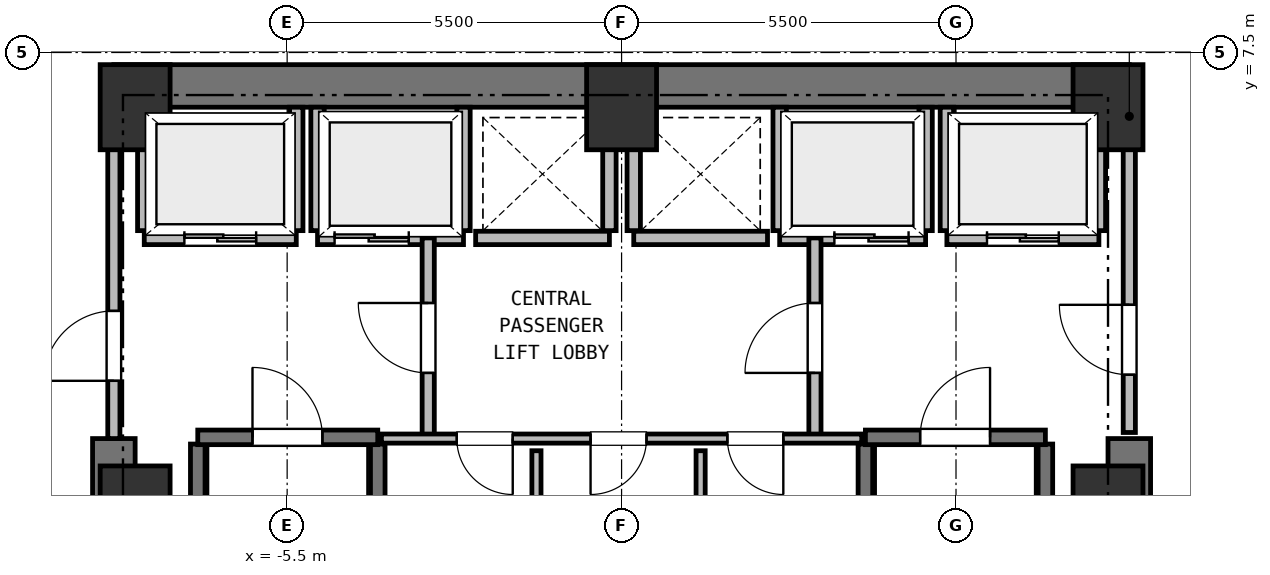
"""IFC4 building model, lengths in metres.
Left out: names, types, materials, properties, quantities, classifications, styles, units other than length and angle.
Written with IfcOpenShell. Run it as: python <this file> out.ifc"""

import sys

from ifc_helpers import new_model, si_unit, direction, frame, frame_2d, origin, origin_2d, place, context, subcontext, project, spatial, rectangle, extrude, element, fill, save


model = new_model("IFC4")
c1 = context("Model", 3, precision=1e-05, world=origin(), true_north=direction((0.0, 1.0)))
c2 = subcontext(c1, "Body", "Model", "MODEL_VIEW")
j1 = project(units=[si_unit("LENGTHUNIT", "METRE"), si_unit("PLANEANGLEUNIT", "RADIAN")], contexts=[c1])
p1 = place(None, origin())
s1 = spatial("IfcSite", under=j1, at=p1, CompositionType="ELEMENT")
p2 = place(p1, origin())
s2 = spatial("IfcBuilding", under=s1, at=p2, CompositionType="ELEMENT")
p3 = place(p2, frame((0.0, 0.0, 16.0)))
s3 = spatial("IfcBuildingStorey", under=s2, at=p3, CompositionType="ELEMENT", Elevation=16.0)
for number, where, z_axis, x_axis in (
    (1, (8.0, 0.0, 0.0), (0.0, 0.0, 1.0), (1.0, 0.0, 0.0)),
    (2, (8.0, 6.6, 0.0), (0.0, 0.0, 1.0), (1.0, 0.0, 0.0)),
    (3, (0.0, 6.6, 0.0), (0.0, 0.0, 1.0), (1.0, 0.0, 0.0)),
    (4, (-8.0, 6.6, 0.0), (0.0, 0.0, 1.0), (1.0, 0.0, 0.0)),
    (5, (-8.0, 0.0, 0.0), (0.0, 0.0, 1.0), (1.0, 0.0, 0.0)),
):
    element("IfcColumn", number, at=place(p3, frame(where, z_axis=z_axis, x_axis=x_axis)), inside=s3, PredefinedType="COLUMN", context=c2, shape_type="SweptSolid", body=[
        extrude(rectangle(XDim=1.15, YDim=1.4, at=origin_2d()), origin(), (0.0, 0.0, 1.0), 5.5),
    ])
p4 = place(p3, frame((-8.35, 6.95, 0.0), z_axis=(0.0, 0.0, 1.0), x_axis=(1.0, 0.0, 0.0)))
e6 = element("IfcWall", 6, at=p4, inside=s3, PredefinedType="SHEAR", context=c2, shape_type="SweptSolid", body=[
    extrude(rectangle(XDim=16.7, YDim=0.7, at=frame_2d((8.35, 0.0))), origin(), (0.0, 0.0, 1.0), 5.22),
])
for number, where, z_axis, x_axis in (
    (7, (-8.35, -6.95, 0.0), (0.0, 0.0, 1.0), (0.0, 1.0, 0.0)),
    (8, (8.35, -6.95, 0.0), (0.0, 0.0, 1.0), (0.0, 1.0, 0.0)),
):
    element("IfcWall", number, at=place(p3, frame(where, z_axis=z_axis, x_axis=x_axis)), inside=s3, PredefinedType="SHEAR", context=c2, shape_type="SweptSolid", body=[
        extrude(rectangle(XDim=8.1, YDim=0.7, at=frame_2d((4.05, 0.0))), origin(), (0.0, 0.0, 1.0), 5.22),
    ])
for number, where, z_axis, x_axis in (
    (9, (-6.97, -6.16, 0.0), (0.0, 0.0, 1.0), (0.0, 1.0, 0.0)),
    (10, (-4.01, -6.16, 0.0), (0.0, 0.0, 1.0), (0.0, 1.0, 0.0)),
):
    element("IfcWall", number, at=place(p3, frame(where, z_axis=z_axis, x_axis=x_axis)), inside=s3, PredefinedType="SHEAR", context=c2, shape_type="SweptSolid", body=[
        extrude(rectangle(XDim=7.22, YDim=0.24, at=frame_2d((3.61, 0.0))), origin(), (0.0, 0.0, 1.0), 5.22),
    ])
p5 = place(p3, frame((-6.97, 1.17, 0.0), z_axis=(0.0, 0.0, 1.0), x_axis=(1.0, 0.0, 0.0)))
e11 = element("IfcWall", 11, at=p5, inside=s3, PredefinedType="SHEAR", context=c2, shape_type="SweptSolid", body=[
    extrude(rectangle(XDim=2.96, YDim=0.24, at=frame_2d((1.48, 0.0))), origin(), (0.0, 0.0, 1.0), 5.22),
])
p6 = place(p5, frame((0.9, 0.0, 0.0)))
e12 = element("IfcOpeningElement", 12, at=p6, cuts=e11, PredefinedType="OPENING", context=c2, shape_type="SweptSolid", body=[
    extrude(rectangle(XDim=1.15, YDim=2.15, at=frame_2d((0.575, 1.075))), frame((0.0, 0.13, 0.0), z_axis=(0.0, -1.0, 0.0), x_axis=(1.0, 0.0, 0.0)), (0.0, 0.0, 1.0), 0.26),
])
for number, where, z_axis, x_axis in (
    (13, (4.01, -6.16, 0.0), (0.0, 0.0, 1.0), (0.0, 1.0, 0.0)),
    (14, (6.97, -6.16, 0.0), (0.0, 0.0, 1.0), (0.0, 1.0, 0.0)),
):
    element("IfcWall", number, at=place(p3, frame(where, z_axis=z_axis, x_axis=x_axis)), inside=s3, PredefinedType="SHEAR", context=c2, shape_type="SweptSolid", body=[
        extrude(rectangle(XDim=7.22, YDim=0.24, at=frame_2d((3.61, 0.0))), origin(), (0.0, 0.0, 1.0), 5.22),
    ])
p7 = place(p3, frame((4.01, 1.17, 0.0), z_axis=(0.0, 0.0, 1.0), x_axis=(1.0, 0.0, 0.0)))
e15 = element("IfcWall", 15, at=p7, inside=s3, PredefinedType="SHEAR", context=c2, shape_type="SweptSolid", body=[
    extrude(rectangle(XDim=2.96, YDim=0.24, at=frame_2d((1.48, 0.0))), origin(), (0.0, 0.0, 1.0), 5.22),
])
p8 = place(p7, frame((0.9, 0.0, 0.0)))
e16 = element("IfcOpeningElement", 16, at=p8, cuts=e15, PredefinedType="OPENING", context=c2, shape_type="SweptSolid", body=[
    extrude(rectangle(XDim=1.15, YDim=2.15, at=frame_2d((0.575, 1.075))), frame((0.0, 0.13, 0.0), z_axis=(0.0, -1.0, 0.0), x_axis=(1.0, 0.0, 0.0)), (0.0, 0.0, 1.0), 0.26),
])
p9 = place(p3, frame((-7.85, 4.45, 0.0), z_axis=(0.0, 0.0, 1.0), x_axis=(1.0, 0.0, 0.0)))
e17 = element("IfcWall", 17, at=p9, inside=s3, PredefinedType="PARTITIONING", context=c2, shape_type="SweptSolid", body=[
    extrude(rectangle(XDim=2.5, YDim=0.22, at=frame_2d((1.25, 0.0))), origin(), (0.0, 0.0, 1.0), 5.22),
])
p10 = place(p9, frame((0.66, 0.0, 0.0)))
e18 = element("IfcOpeningElement", 18, at=p10, cuts=e17, PredefinedType="OPENING", context=c2, shape_type="SweptSolid", body=[
    extrude(rectangle(XDim=1.18, YDim=2.15, at=frame_2d((0.59, 1.075))), frame((0.0, 0.12, 0.0), z_axis=(0.0, -1.0, 0.0), x_axis=(1.0, 0.0, 0.0)), (0.0, 0.0, 1.0), 0.24),
])
p11 = place(p3, frame((-7.85, 4.57, 0.0), z_axis=(0.0, 0.0, 1.0), x_axis=(0.0, 1.0, 0.0)))
e19 = element("IfcWall", 19, at=p11, inside=s3, PredefinedType="PARTITIONING", context=c2, shape_type="SweptSolid", body=[
    extrude(rectangle(XDim=2.03, YDim=0.22, at=frame_2d((1.015, 0.0))), origin(), (0.0, 0.0, 1.0), 4.8),
])
p12 = place(p3, frame((-5.35, 4.57, 0.0), z_axis=(0.0, 0.0, 1.0), x_axis=(0.0, 1.0, 0.0)))
e20 = element("IfcWall", 20, at=p12, inside=s3, PredefinedType="PARTITIONING", context=c2, shape_type="SweptSolid", body=[
    extrude(rectangle(XDim=2.03, YDim=0.22, at=frame_2d((1.015, 0.0))), origin(), (0.0, 0.0, 1.0), 5.22),
])
p13 = place(p3, frame((5.35, 4.45, 0.0), z_axis=(0.0, 0.0, 1.0), x_axis=(1.0, 0.0, 0.0)))
e21 = element("IfcWall", 21, at=p13, inside=s3, PredefinedType="PARTITIONING", context=c2, shape_type="SweptSolid", body=[
    extrude(rectangle(XDim=2.5, YDim=0.22, at=frame_2d((1.25, 0.0))), origin(), (0.0, 0.0, 1.0), 5.22),
])
p14 = place(p13, frame((0.66, 0.0, 0.0)))
e22 = element("IfcOpeningElement", 22, at=p14, cuts=e21, PredefinedType="OPENING", context=c2, shape_type="SweptSolid", body=[
    extrude(rectangle(XDim=1.18, YDim=2.15, at=frame_2d((0.59, 1.075))), frame((0.0, 0.12, 0.0), z_axis=(0.0, -1.0, 0.0), x_axis=(1.0, 0.0, 0.0)), (0.0, 0.0, 1.0), 0.24),
])
p15 = place(p3, frame((5.35, 4.57, 0.0), z_axis=(0.0, 0.0, 1.0), x_axis=(0.0, 1.0, 0.0)))
e23 = element("IfcWall", 23, at=p15, inside=s3, PredefinedType="PARTITIONING", context=c2, shape_type="SweptSolid", body=[
    extrude(rectangle(XDim=2.03, YDim=0.22, at=frame_2d((1.015, 0.0))), origin(), (0.0, 0.0, 1.0), 5.22),
])
p16 = place(p3, frame((7.85, 4.57, 0.0), z_axis=(0.0, 0.0, 1.0), x_axis=(0.0, 1.0, 0.0)))
e24 = element("IfcWall", 24, at=p16, inside=s3, PredefinedType="PARTITIONING", context=c2, shape_type="SweptSolid", body=[
    extrude(rectangle(XDim=2.03, YDim=0.22, at=frame_2d((1.015, 0.0))), origin(), (0.0, 0.0, 1.0), 4.8),
])
p17 = place(p3, frame((-5.0, 4.45, 0.0), z_axis=(0.0, 0.0, 1.0), x_axis=(1.0, 0.0, 0.0)))
e25 = element("IfcWall", 25, at=p17, inside=s3, PredefinedType="PARTITIONING", context=c2, shape_type="SweptSolid", body=[
    extrude(rectangle(XDim=2.4, YDim=0.22, at=frame_2d((1.2, 0.0))), origin(), (0.0, 0.0, 1.0), 5.22),
])
p18 = place(p17, frame((0.28, 0.0, 0.0)))
e26 = element("IfcOpeningElement", 26, at=p18, cuts=e25, PredefinedType="OPENING", context=c2, shape_type="SweptSolid", body=[
    extrude(rectangle(XDim=1.22, YDim=2.15, at=frame_2d((0.61, 1.075))), frame((0.0, 0.12, 0.0), z_axis=(0.0, -1.0, 0.0), x_axis=(1.0, 0.0, 0.0)), (0.0, 0.0, 1.0), 0.24),
])
for number, where, z_axis, x_axis in (
    (27, (-5.0, 4.57, 0.0), (0.0, 0.0, 1.0), (0.0, 1.0, 0.0)),
    (28, (-2.6, 4.57, 0.0), (0.0, 0.0, 1.0), (0.0, 1.0, 0.0)),
):
    element("IfcWall", number, at=place(p3, frame(where, z_axis=z_axis, x_axis=x_axis)), inside=s3, PredefinedType="PARTITIONING", context=c2, shape_type="SweptSolid", body=[
        extrude(rectangle(XDim=2.03, YDim=0.22, at=frame_2d((1.015, 0.0))), origin(), (0.0, 0.0, 1.0), 5.22),
    ])
p19 = place(p3, frame((2.6, 4.45, 0.0), z_axis=(0.0, 0.0, 1.0), x_axis=(1.0, 0.0, 0.0)))
e29 = element("IfcWall", 29, at=p19, inside=s3, PredefinedType="PARTITIONING", context=c2, shape_type="SweptSolid", body=[
    extrude(rectangle(XDim=2.4, YDim=0.22, at=frame_2d((1.2, 0.0))), origin(), (0.0, 0.0, 1.0), 5.22),
])
p20 = place(p19, frame((0.9, 0.0, 0.0)))
e30 = element("IfcOpeningElement", 30, at=p20, cuts=e29, PredefinedType="OPENING", context=c2, shape_type="SweptSolid", body=[
    extrude(rectangle(XDim=1.22, YDim=2.15, at=frame_2d((0.61, 1.075))), frame((0.0, 0.12, 0.0), z_axis=(0.0, -1.0, 0.0), x_axis=(1.0, 0.0, 0.0)), (0.0, 0.0, 1.0), 0.24),
])
for number, where, z_axis, x_axis in (
    (31, (2.6, 4.57, 0.0), (0.0, 0.0, 1.0), (0.0, 1.0, 0.0)),
    (32, (5.0, 4.57, 0.0), (0.0, 0.0, 1.0), (0.0, 1.0, 0.0)),
):
    element("IfcWall", number, at=place(p3, frame(where, z_axis=z_axis, x_axis=x_axis)), inside=s3, PredefinedType="PARTITIONING", context=c2, shape_type="SweptSolid", body=[
        extrude(rectangle(XDim=2.03, YDim=0.22, at=frame_2d((1.015, 0.0))), origin(), (0.0, 0.0, 1.0), 5.22),
    ])
p21 = place(p3, frame((-2.4, 4.45, 0.0), z_axis=(0.0, 0.0, 1.0), x_axis=(1.0, 0.0, 0.0)))
e33 = element("IfcWall", 33, at=p21, inside=s3, PredefinedType="PARTITIONING", context=c2, shape_type="SweptSolid", body=[
    extrude(rectangle(XDim=2.2, YDim=0.22, at=frame_2d((1.1, 0.0))), origin(), (0.0, 0.0, 1.0), 5.22),
])
p22 = place(p3, frame((-0.2, 4.57, 0.0), z_axis=(0.0, 0.0, 1.0), x_axis=(0.0, 1.0, 0.0)))
e34 = element("IfcWall", 34, at=p22, inside=s3, PredefinedType="PARTITIONING", context=c2, shape_type="SweptSolid", body=[
    extrude(rectangle(XDim=2.03, YDim=0.22, at=frame_2d((1.015, 0.0))), origin(), (0.0, 0.0, 1.0), 5.22),
])
p23 = place(p3, frame((0.2, 4.45, 0.0), z_axis=(0.0, 0.0, 1.0), x_axis=(1.0, 0.0, 0.0)))
e35 = element("IfcWall", 35, at=p23, inside=s3, PredefinedType="PARTITIONING", context=c2, shape_type="SweptSolid", body=[
    extrude(rectangle(XDim=2.2, YDim=0.22, at=frame_2d((1.1, 0.0))), origin(), (0.0, 0.0, 1.0), 5.22),
])
p24 = place(p3, frame((0.2, 4.57, 0.0), z_axis=(0.0, 0.0, 1.0), x_axis=(0.0, 1.0, 0.0)))
e36 = element("IfcWall", 36, at=p24, inside=s3, PredefinedType="PARTITIONING", context=c2, shape_type="SweptSolid", body=[
    extrude(rectangle(XDim=2.03, YDim=0.22, at=frame_2d((1.015, 0.0))), origin(), (0.0, 0.0, 1.0), 5.22),
])
p25 = place(p3, frame((-3.18, 1.15, 0.0), z_axis=(0.0, 0.0, 1.0), x_axis=(0.0, 1.0, 0.0)))
e37 = element("IfcWall", 37, at=p25, inside=s3, PredefinedType="PARTITIONING", context=c2, shape_type="SweptSolid", body=[
    extrude(rectangle(XDim=3.3, YDim=0.2, at=frame_2d((1.65, 0.0))), origin(), (0.0, 0.0, 1.0), 5.22),
])
p26 = place(p25, frame((1.08, 0.0, 0.0)))
e38 = element("IfcOpeningElement", 38, at=p26, cuts=e37, PredefinedType="OPENING", context=c2, shape_type="SweptSolid", body=[
    extrude(rectangle(XDim=1.15, YDim=2.15, at=frame_2d((0.575, 1.075))), frame((0.0, 0.11, 0.0), z_axis=(0.0, -1.0, 0.0), x_axis=(1.0, 0.0, 0.0)), (0.0, 0.0, 1.0), 0.22),
])
p27 = place(p3, frame((3.18, 1.15, 0.0), z_axis=(0.0, 0.0, 1.0), x_axis=(0.0, 1.0, 0.0)))
e39 = element("IfcWall", 39, at=p27, inside=s3, PredefinedType="PARTITIONING", context=c2, shape_type="SweptSolid", body=[
    extrude(rectangle(XDim=3.3, YDim=0.2, at=frame_2d((1.65, 0.0))), origin(), (0.0, 0.0, 1.0), 5.22),
])
p28 = place(p27, frame((1.08, 0.0, 0.0)))
e40 = element("IfcOpeningElement", 40, at=p28, cuts=e39, PredefinedType="OPENING", context=c2, shape_type="SweptSolid", body=[
    extrude(rectangle(XDim=1.15, YDim=2.15, at=frame_2d((0.575, 1.075))), frame((0.0, 0.11, 0.0), z_axis=(0.0, -1.0, 0.0), x_axis=(1.0, 0.0, 0.0)), (0.0, 0.0, 1.0), 0.22),
])
p29 = place(p3, frame((-8.35, 1.15, 0.0), z_axis=(0.0, 0.0, 1.0), x_axis=(0.0, 1.0, 0.0)))
e41 = element("IfcWall", 41, at=p29, inside=s3, PredefinedType="PARTITIONING", context=c2, shape_type="SweptSolid", body=[
    extrude(rectangle(XDim=5.4, YDim=0.2, at=frame_2d((2.7, 0.0))), origin(), (0.0, 0.0, 1.0), 5.22),
])
p30 = place(p29, frame((0.95, 0.0, 0.0)))
e42 = element("IfcOpeningElement", 42, at=p30, cuts=e41, PredefinedType="OPENING", context=c2, shape_type="SweptSolid", body=[
    extrude(rectangle(XDim=1.15, YDim=2.15, at=frame_2d((0.575, 1.075))), frame((0.0, 0.11, 0.0), z_axis=(0.0, -1.0, 0.0), x_axis=(1.0, 0.0, 0.0)), (0.0, 0.0, 1.0), 0.22),
])
p31 = place(p3, frame((8.35, 1.25, 0.0), z_axis=(0.0, 0.0, 1.0), x_axis=(0.0, 1.0, 0.0)))
e43 = element("IfcWall", 43, at=p31, inside=s3, PredefinedType="PARTITIONING", context=c2, shape_type="SweptSolid", body=[
    extrude(rectangle(XDim=5.3, YDim=0.2, at=frame_2d((2.65, 0.0))), origin(), (0.0, 0.0, 1.0), 5.22),
])
p32 = place(p31, frame((0.95, 0.0, 0.0)))
e44 = element("IfcOpeningElement", 44, at=p32, cuts=e43, PredefinedType="OPENING", context=c2, shape_type="SweptSolid", body=[
    extrude(rectangle(XDim=1.15, YDim=2.15, at=frame_2d((0.575, 1.075))), frame((0.0, 0.11, 0.0), z_axis=(0.0, -1.0, 0.0), x_axis=(1.0, 0.0, 0.0)), (0.0, 0.0, 1.0), 0.22),
])
p33 = place(p3, frame((3.95, 1.15, 0.0), z_axis=(0.0, 0.0, 1.0), x_axis=(-1.0, 0.0, 0.0)))
e45 = element("IfcWall", 45, at=p33, inside=s3, PredefinedType="PARTITIONING", context=c2, shape_type="SweptSolid", body=[
    extrude(rectangle(XDim=7.9, YDim=0.15, at=frame_2d((3.95, 0.0))), origin(), (0.0, 0.0, 1.0), 5.22),
])
p34 = place(p33, frame((5.74, 0.0, 0.0)))
e46 = element("IfcOpeningElement", 46, at=p34, cuts=e45, PredefinedType="OPENING", context=c2, shape_type="SweptSolid", body=[
    extrude(rectangle(XDim=0.92, YDim=2.05, at=frame_2d((0.46, 1.025))), frame((0.0, 0.085, 0.0), z_axis=(0.0, -1.0, 0.0), x_axis=(1.0, 0.0, 0.0)), (0.0, 0.0, 1.0), 0.17),
])
p35 = place(p33, frame((3.54, 0.0, 0.0)))
e47 = element("IfcOpeningElement", 47, at=p35, cuts=e45, PredefinedType="OPENING", context=c2, shape_type="SweptSolid", body=[
    extrude(rectangle(XDim=0.92, YDim=2.05, at=frame_2d((0.46, 1.025))), frame((0.0, 0.085, 0.0), z_axis=(0.0, -1.0, 0.0), x_axis=(1.0, 0.0, 0.0)), (0.0, 0.0, 1.0), 0.17),
])
p36 = place(p33, frame((1.29, 0.0, 0.0)))
e48 = element("IfcOpeningElement", 48, at=p36, cuts=e45, PredefinedType="OPENING", context=c2, shape_type="SweptSolid", body=[
    extrude(rectangle(XDim=0.92, YDim=2.05, at=frame_2d((0.46, 1.025))), frame((0.0, 0.085, 0.0), z_axis=(0.0, -1.0, 0.0), x_axis=(1.0, 0.0, 0.0)), (0.0, 0.0, 1.0), 0.17),
])
for number, where, z_axis, x_axis in (
    (49, (-1.4, -4.08, 0.0), (0.0, 0.0, 1.0), (0.0, 1.0, 0.0)),
    (50, (1.3, -4.08, 0.0), (0.0, 0.0, 1.0), (0.0, 1.0, 0.0)),
):
    element("IfcWall", number, at=place(p3, frame(where, z_axis=z_axis, x_axis=x_axis)), inside=s3, PredefinedType="PARTITIONING", context=c2, shape_type="SweptSolid", body=[
        extrude(rectangle(XDim=5.03, YDim=0.15, at=frame_2d((2.515, 0.0))), origin(), (0.0, 0.0, 1.0), 5.22),
    ])
p37 = place(p6, origin())
e51 = element("IfcDoor", 51, at=p37, inside=s3, OperationType="SINGLE_SWING_LEFT", PredefinedType="DOOR", context=c2, shape_type="SweptSolid", body=[
    extrude(rectangle(XDim=1.15, YDim=2.15, at=frame_2d((0.575, 1.075))), frame((0.0, 0.025, 0.0), z_axis=(0.0, -1.0, 0.0), x_axis=(1.0, 0.0, 0.0)), (0.0, 0.0, 1.0), 0.05),
])
fill(e12, e51)
p38 = place(p8, origin())
e52 = element("IfcDoor", 52, at=p38, inside=s3, OperationType="SINGLE_SWING_RIGHT", PredefinedType="DOOR", context=c2, shape_type="SweptSolid", body=[
    extrude(rectangle(XDim=1.15, YDim=2.15, at=frame_2d((0.575, 1.075))), frame((0.0, 0.025, 0.0), z_axis=(0.0, -1.0, 0.0), x_axis=(1.0, 0.0, 0.0)), (0.0, 0.0, 1.0), 0.05),
])
fill(e16, e52)
p39 = place(p10, origin())
e53 = element("IfcDoor", 53, at=p39, inside=s3, OperationType="DOUBLE_DOOR_SLIDING", PredefinedType="DOOR", context=c2, shape_type="SweptSolid", body=[
    extrude(rectangle(XDim=1.18, YDim=2.15, at=frame_2d((0.59, 1.075))), frame((0.0, 0.025, 0.0), z_axis=(0.0, -1.0, 0.0), x_axis=(1.0, 0.0, 0.0)), (0.0, 0.0, 1.0), 0.05),
])
fill(e18, e53)
p40 = place(p14, origin())
e54 = element("IfcDoor", 54, at=p40, inside=s3, OperationType="DOUBLE_DOOR_SLIDING", PredefinedType="DOOR", context=c2, shape_type="SweptSolid", body=[
    extrude(rectangle(XDim=1.18, YDim=2.15, at=frame_2d((0.59, 1.075))), frame((0.0, 0.025, 0.0), z_axis=(0.0, -1.0, 0.0), x_axis=(1.0, 0.0, 0.0)), (0.0, 0.0, 1.0), 0.05),
])
fill(e22, e54)
p41 = place(p18, origin())
e55 = element("IfcDoor", 55, at=p41, inside=s3, OperationType="DOUBLE_DOOR_SLIDING", PredefinedType="DOOR", context=c2, shape_type="SweptSolid", body=[
    extrude(rectangle(XDim=1.22, YDim=2.15, at=frame_2d((0.61, 1.075))), frame((0.0, 0.025, 0.0), z_axis=(0.0, -1.0, 0.0), x_axis=(1.0, 0.0, 0.0)), (0.0, 0.0, 1.0), 0.05),
])
fill(e26, e55)
p42 = place(p20, origin())
e56 = element("IfcDoor", 56, at=p42, inside=s3, OperationType="DOUBLE_DOOR_SLIDING", PredefinedType="DOOR", context=c2, shape_type="SweptSolid", body=[
    extrude(rectangle(XDim=1.22, YDim=2.15, at=frame_2d((0.61, 1.075))), frame((0.0, 0.025, 0.0), z_axis=(0.0, -1.0, 0.0), x_axis=(1.0, 0.0, 0.0)), (0.0, 0.0, 1.0), 0.05),
])
fill(e30, e56)
p43 = place(p26, origin())
e57 = element("IfcDoor", 57, at=p43, inside=s3, OperationType="SINGLE_SWING_RIGHT", PredefinedType="DOOR", context=c2, shape_type="SweptSolid", body=[
    extrude(rectangle(XDim=1.15, YDim=2.15, at=frame_2d((0.575, 1.075))), frame((0.0, 0.025, 0.0), z_axis=(0.0, -1.0, 0.0), x_axis=(1.0, 0.0, 0.0)), (0.0, 0.0, 1.0), 0.05),
])
fill(e38, e57)
p44 = place(p28, origin())
e58 = element("IfcDoor", 58, at=p44, inside=s3, OperationType="SINGLE_SWING_LEFT", PredefinedType="DOOR", context=c2, shape_type="SweptSolid", body=[
    extrude(rectangle(XDim=1.15, YDim=2.15, at=frame_2d((0.575, 1.075))), frame((0.0, 0.025, 0.0), z_axis=(0.0, -1.0, 0.0), x_axis=(1.0, 0.0, 0.0)), (0.0, 0.0, 1.0), 0.05),
])
fill(e40, e58)
p45 = place(p30, origin())
e59 = element("IfcDoor", 59, at=p45, inside=s3, OperationType="SINGLE_SWING_LEFT", PredefinedType="DOOR", context=c2, shape_type="SweptSolid", body=[
    extrude(rectangle(XDim=1.15, YDim=2.15, at=frame_2d((0.575, 1.075))), frame((0.0, 0.025, 0.0), z_axis=(0.0, -1.0, 0.0), x_axis=(1.0, 0.0, 0.0)), (0.0, 0.0, 1.0), 0.05),
])
fill(e42, e59)
p46 = place(p32, origin())
e60 = element("IfcDoor", 60, at=p46, inside=s3, OperationType="SINGLE_SWING_RIGHT", PredefinedType="DOOR", context=c2, shape_type="SweptSolid", body=[
    extrude(rectangle(XDim=1.15, YDim=2.15, at=frame_2d((0.575, 1.075))), frame((0.0, 0.025, 0.0), z_axis=(0.0, -1.0, 0.0), x_axis=(1.0, 0.0, 0.0)), (0.0, 0.0, 1.0), 0.05),
])
fill(e44, e60)
p47 = place(p34, origin())
e61 = element("IfcDoor", 61, at=p47, inside=s3, OperationType="SINGLE_SWING_LEFT", PredefinedType="DOOR", context=c2, shape_type="SweptSolid", body=[
    extrude(rectangle(XDim=0.92, YDim=2.05, at=frame_2d((0.46, 1.025))), frame((0.0, 0.025, 0.0), z_axis=(0.0, -1.0, 0.0), x_axis=(1.0, 0.0, 0.0)), (0.0, 0.0, 1.0), 0.05),
])
fill(e46, e61)
p48 = place(p35, origin())
e62 = element("IfcDoor", 62, at=p48, inside=s3, OperationType="SINGLE_SWING_RIGHT", PredefinedType="DOOR", context=c2, shape_type="SweptSolid", body=[
    extrude(rectangle(XDim=0.92, YDim=2.05, at=frame_2d((0.46, 1.025))), frame((0.0, 0.025, 0.0), z_axis=(0.0, -1.0, 0.0), x_axis=(1.0, 0.0, 0.0)), (0.0, 0.0, 1.0), 0.05),
])
fill(e47, e62)
p49 = place(p36, origin())
e63 = element("IfcDoor", 63, at=p49, inside=s3, OperationType="SINGLE_SWING_LEFT", PredefinedType="DOOR", context=c2, shape_type="SweptSolid", body=[
    extrude(rectangle(XDim=0.92, YDim=2.05, at=frame_2d((0.46, 1.025))), frame((0.0, 0.025, 0.0), z_axis=(0.0, -1.0, 0.0), x_axis=(1.0, 0.0, 0.0)), (0.0, 0.0, 1.0), 0.05),
])
fill(e48, e63)
save(model, sys.argv[1])
